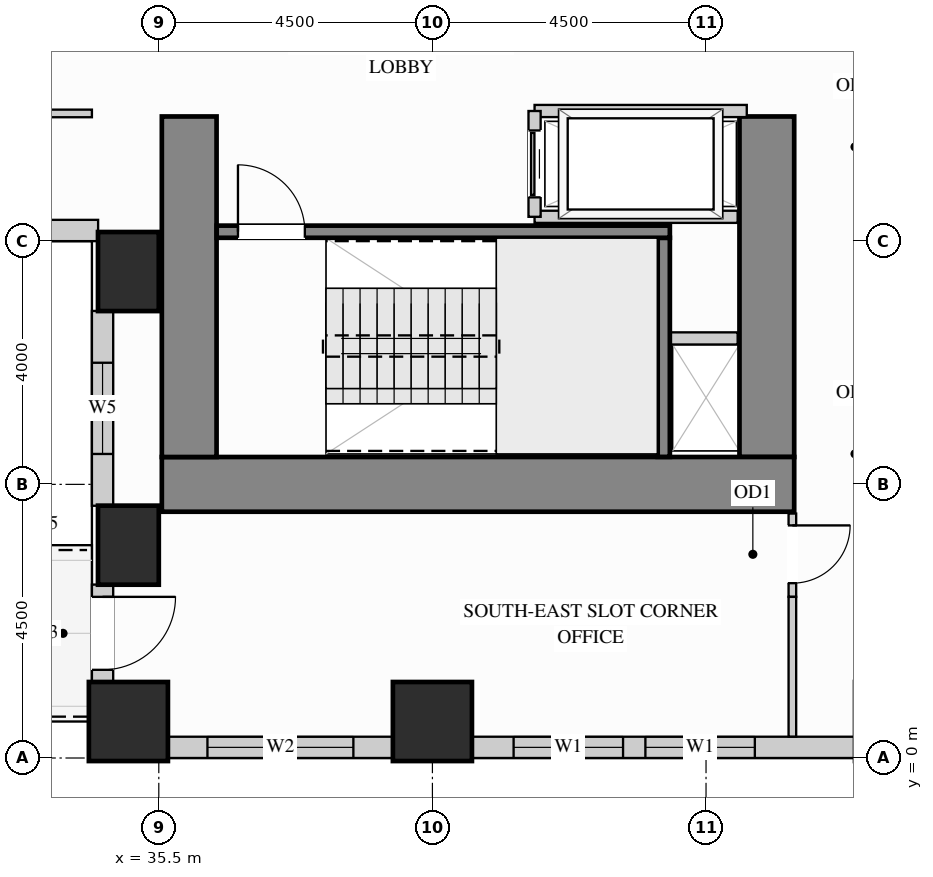
"""IFC4 building model, lengths in metres.
Left out: names, types, materials, properties, quantities, classifications, styles, units other than length and angle.
Written with IfcOpenShell. Run it as: python <this file> out.ifc"""

import sys

from ifc_helpers import new_model, si_unit, direction, frame, frame_2d, origin, origin_2d, place, context, subcontext, project, spatial, rectangle, extrude, source, transform, mapped, element, fill, save


model = new_model("IFC4")
c1 = context("Model", 3, precision=1e-05, world=origin(), true_north=direction((0.0, 1.0)))
c2 = subcontext(c1, "Body", "Model", "MODEL_VIEW")
j1 = project(units=[si_unit("LENGTHUNIT", "METRE"), si_unit("PLANEANGLEUNIT", "RADIAN")], contexts=[c1])
p1 = place(None, origin())
s1 = spatial("IfcSite", under=j1, at=p1, CompositionType="ELEMENT")
p2 = place(p1, origin())
s2 = spatial("IfcBuilding", under=s1, at=p2, CompositionType="ELEMENT")
p3 = place(p2, frame((0.0, 0.0, 33.3)))
s3 = spatial("IfcBuildingStorey", under=s2, at=p3, CompositionType="ELEMENT", Elevation=33.3)
m1 = source(origin(), c2, "Body", "SweptSolid", [
    extrude(rectangle(XDim=1.0, YDim=1.3, at=origin_2d()), origin(), (0.0, 0.0, 1.0), 3.38),
])
for number, where, z_axis, x_axis in (
    (1, (35.0, 3.5, 0.0), (0.0, 0.0, 1.0), (1.0, 0.0, 0.0)),
    (2, (35.0, 8.0, 0.0), (0.0, 0.0, 1.0), (1.0, 0.0, 0.0)),
):
    element("IfcColumn", number, at=place(p3, frame(where, z_axis=z_axis, x_axis=x_axis)), inside=s3, PredefinedType="COLUMN", context=c2, shape_type="MappedRepresentation", body=[
        mapped(m1, transform((0.0, 0.0, 0.0), x_axis=(1.0, 0.0, 0.0), y_axis=(0.0, 1.0, 0.0), z_axis=(0.0, 0.0, 1.0))),
    ])
m2 = source(origin(), c2, "Body", "SweptSolid", [
    extrude(rectangle(XDim=1.3, YDim=1.3, at=origin_2d()), origin(), (0.0, 0.0, 1.0), 3.38),
])
for number, where, z_axis, x_axis in (
    (3, (35.0, 0.6, 0.0), (0.0, 0.0, 1.0), (1.0, 0.0, 0.0)),
    (4, (40.0, 0.6, 0.0), (0.0, 0.0, 1.0), (1.0, 0.0, 0.0)),
):
    element("IfcColumn", number, at=place(p3, frame(where, z_axis=z_axis, x_axis=x_axis)), inside=s3, PredefinedType="COLUMN", context=c2, shape_type="MappedRepresentation", body=[
        mapped(m2, transform((0.0, 0.0, 0.0), x_axis=(1.0, 0.0, 0.0), y_axis=(0.0, 1.0, 0.0), z_axis=(0.0, 0.0, 1.0))),
    ])
m3 = source(origin(), c2, "Body", "SweptSolid", [
    extrude(rectangle(XDim=5.6, YDim=0.9, at=frame_2d((2.8, 0.0))), origin(), (0.0, 0.0, 1.0), 3.38),
])
p4 = place(p3, frame((45.5, 4.95, 0.0), z_axis=(0.0, 0.0, 1.0), x_axis=(0.0, 1.0, 0.0)))
e5 = element("IfcWall", 5, at=p4, inside=s3, PredefinedType="SHEAR", context=c2, shape_type="MappedRepresentation", body=[
    mapped(m3, transform((0.0, 0.0, 0.0), x_axis=(1.0, 0.0, 0.0), y_axis=(0.0, 1.0, 0.0), z_axis=(0.0, 0.0, 1.0))),
])
m4 = source(origin(), c2, "Body", "SweptSolid", [
    extrude(rectangle(XDim=10.4, YDim=0.9, at=frame_2d((5.2, 0.0))), origin(), (0.0, 0.0, 1.0), 3.38),
])
p5 = place(p3, frame((35.55, 4.5, 0.0), z_axis=(0.0, 0.0, 1.0), x_axis=(1.0, 0.0, 0.0)))
e6 = element("IfcWall", 6, at=p5, inside=s3, PredefinedType="SHEAR", context=c2, shape_type="MappedRepresentation", body=[
    mapped(m4, transform((0.0, 0.0, 0.0), x_axis=(1.0, 0.0, 0.0), y_axis=(0.0, 1.0, 0.0), z_axis=(0.0, 0.0, 1.0))),
])
p6 = place(p3, frame((36.0, 4.95, 0.0), z_axis=(0.0, 0.0, 1.0), x_axis=(0.0, 1.0, 0.0)))
e7 = element("IfcWall", 7, at=p6, inside=s3, PredefinedType="SHEAR", context=c2, shape_type="MappedRepresentation", body=[
    mapped(m3, transform((0.0, 0.0, 0.0), x_axis=(1.0, 0.0, 0.0), y_axis=(0.0, 1.0, 0.0), z_axis=(0.0, 0.0, 1.0))),
])
p7 = place(p3, frame((30.998, 8.675, 0.0), z_axis=(0.0, 0.0, 1.0), x_axis=(1.0, 0.0, 0.0)))
e8 = element("IfcWall", 8, at=p7, inside=s3, PredefinedType="SOLIDWALL", context=c2, shape_type="SweptSolid", body=[
    extrude(rectangle(XDim=3.504, YDim=0.35, at=frame_2d((1.752, 0.0))), origin(), (0.0, 0.0, 1.0), 3.365),
])
p8 = place(p7, frame((1.002, 0.0, 0.78)))
e9 = element("IfcOpeningElement", 9, at=p8, cuts=e8, PredefinedType="OPENING", context=c2, shape_type="SweptSolid", body=[
    extrude(rectangle(XDim=1.5, YDim=2.0, at=frame_2d((0.75, 1.0))), frame((0.0, 0.185, 0.0), z_axis=(0.0, -1.0, 0.0), x_axis=(1.0, 0.0, 0.0)), (0.0, 0.0, 1.0), 0.37),
])
p9 = place(p3, frame((34.575, 7.352, 0.0), z_axis=(0.0, 0.0, 1.0), x_axis=(0.0, -1.0, 0.0)))
e10 = element("IfcWall", 10, at=p9, inside=s3, PredefinedType="SOLIDWALL", context=c2, shape_type="SweptSolid", body=[
    extrude(rectangle(XDim=3.204, YDim=0.35, at=frame_2d((1.602, 0.0))), origin(), (0.0, 0.0, 1.0), 2.51),
])
p10 = place(p9, frame((0.852, 0.0, 0.78)))
e11 = element("IfcOpeningElement", 11, at=p10, cuts=e10, PredefinedType="OPENING", context=c2, shape_type="SweptSolid", body=[
    extrude(rectangle(XDim=1.5, YDim=1.55, at=frame_2d((0.75, 0.775))), frame((0.0, 0.185, 0.0), z_axis=(0.0, -1.0, 0.0), x_axis=(1.0, 0.0, 0.0)), (0.0, 0.0, 1.0), 0.37),
])
p11 = place(p3, frame((34.575, 2.852, 0.0), z_axis=(0.0, 0.0, 1.0), x_axis=(0.0, -1.0, 0.0)))
e12 = element("IfcWall", 12, at=p11, inside=s3, PredefinedType="SOLIDWALL", context=c2, shape_type="SweptSolid", body=[
    extrude(rectangle(XDim=1.604, YDim=0.35, at=frame_2d((0.802, 0.0))), origin(), (0.0, 0.0, 1.0), 2.51),
])
p12 = place(p11, frame((0.202, 0.0, 0.0)))
e13 = element("IfcOpeningElement", 13, at=p12, cuts=e12, PredefinedType="OPENING", context=c2, shape_type="SweptSolid", body=[
    extrude(rectangle(XDim=1.2, YDim=2.15, at=frame_2d((0.6, 1.075))), frame((0.0, 0.185, 0.0), z_axis=(0.0, -1.0, 0.0), x_axis=(1.0, 0.0, 0.0)), (0.0, 0.0, 1.0), 0.37),
])
p13 = place(p3, frame((35.648, 0.175, 0.0), z_axis=(0.0, 0.0, 1.0), x_axis=(1.0, 0.0, 0.0)))
e14 = element("IfcWall", 14, at=p13, inside=s3, PredefinedType="SOLIDWALL", context=c2, shape_type="SweptSolid", body=[
    extrude(rectangle(XDim=3.704, YDim=0.35, at=frame_2d((1.852, 0.0))), origin(), (0.0, 0.0, 1.0), 2.51),
])
p14 = place(p13, frame((0.652, 0.0, 0.78)))
e15 = element("IfcOpeningElement", 15, at=p14, cuts=e14, PredefinedType="OPENING", context=c2, shape_type="SweptSolid", body=[
    extrude(rectangle(XDim=2.4, YDim=1.55, at=frame_2d((1.2, 0.775))), frame((0.0, 0.185, 0.0), z_axis=(0.0, -1.0, 0.0), x_axis=(1.0, 0.0, 0.0)), (0.0, 0.0, 1.0), 0.37),
])
p15 = place(p3, frame((40.648, 0.175, 0.0), z_axis=(0.0, 0.0, 1.0), x_axis=(1.0, 0.0, 0.0)))
e16 = element("IfcWall", 16, at=p15, inside=s3, PredefinedType="SOLIDWALL", context=c2, shape_type="SweptSolid", body=[
    extrude(rectangle(XDim=6.304, YDim=0.35, at=frame_2d((3.152, 0.0))), origin(), (0.0, 0.0, 1.0), 2.51),
])
p16 = place(p15, frame((0.687, 0.0, 0.78)))
e17 = element("IfcOpeningElement", 17, at=p16, cuts=e16, PredefinedType="OPENING", context=c2, shape_type="SweptSolid", body=[
    extrude(rectangle(XDim=1.8, YDim=1.55, at=frame_2d((0.9, 0.775))), frame((0.0, 0.185, 0.0), z_axis=(0.0, -1.0, 0.0), x_axis=(1.0, 0.0, 0.0)), (0.0, 0.0, 1.0), 0.37),
])
p17 = place(p15, frame((2.855, 0.0, 0.78)))
e18 = element("IfcOpeningElement", 18, at=p17, cuts=e16, PredefinedType="OPENING", context=c2, shape_type="SweptSolid", body=[
    extrude(rectangle(XDim=1.8, YDim=1.55, at=frame_2d((0.9, 0.775))), frame((0.0, 0.185, 0.0), z_axis=(0.0, -1.0, 0.0), x_axis=(1.0, 0.0, 0.0)), (0.0, 0.0, 1.0), 0.37),
])
p18 = place(p3, frame((45.92, 2.65, 0.0), z_axis=(0.0, 0.0, 1.0), x_axis=(0.0, 1.0, 0.0)))
e19 = element("IfcWall", 19, at=p18, inside=s3, PredefinedType="PARTITIONING", context=c2, shape_type="SweptSolid", body=[
    extrude(rectangle(XDim=1.37, YDim=0.125, at=frame_2d((0.685, 0.0))), origin(), (0.0, 0.0, 1.0), 3.365),
])
p19 = place(p18, frame((0.225, 0.0, 0.0)))
e20 = element("IfcOpeningElement", 20, at=p19, cuts=e19, PredefinedType="OPENING", context=c2, shape_type="SweptSolid", body=[
    extrude(rectangle(XDim=0.95, YDim=2.15, at=frame_2d((0.475, 1.075))), frame((0.0, 0.073, 0.0), z_axis=(0.0, -1.0, 0.0), x_axis=(1.0, 0.0, 0.0)), (0.0, 0.0, 1.0), 0.145),
])
m5 = source(origin(), c2, "Body", "SweptSolid", [
    extrude(rectangle(XDim=2.298, YDim=0.125, at=frame_2d((1.149, 0.0))), origin(), (0.0, 0.0, 1.0), 3.365),
])
p20 = place(p3, frame((45.92, 0.352, 0.0), z_axis=(0.0, 0.0, 1.0), x_axis=(0.0, 1.0, 0.0)))
e21 = element("IfcWall", 21, at=p20, inside=s3, PredefinedType="PARTITIONING", context=c2, shape_type="MappedRepresentation", body=[
    mapped(m5, transform((0.0, 0.0, 0.0), x_axis=(1.0, 0.0, 0.0), y_axis=(0.0, 1.0, 0.0), z_axis=(0.0, 0.0, 1.0))),
])
p21 = place(p3, frame((19.5, 10.6, 0.0), z_axis=(0.0, 0.0, 1.0), x_axis=(1.0, 0.0, 0.0)))
e22 = element("IfcWall", 22, at=p21, inside=s3, PredefinedType="PARTITIONING", context=c2, shape_type="SweptSolid", body=[
    extrude(rectangle(XDim=14.9, YDim=0.125, at=frame_2d((7.45, 0.0))), origin(), (0.0, 0.0, 1.0), 3.365),
])
p22 = place(p21, frame((6.975, 0.0, 0.0)))
e23 = element("IfcOpeningElement", 23, at=p22, cuts=e22, PredefinedType="OPENING", context=c2, shape_type="SweptSolid", body=[
    extrude(rectangle(XDim=0.95, YDim=2.15, at=frame_2d((0.475, 1.075))), frame((0.0, 0.073, 0.0), z_axis=(0.0, -1.0, 0.0), x_axis=(1.0, 0.0, 0.0)), (0.0, 0.0, 1.0), 0.145),
])
m6 = source(origin(), c2, "Body", "SweptSolid", [
    extrude(rectangle(XDim=1.17, YDim=0.2, at=frame_2d((0.585, 0.0))), origin(), (0.0, 0.0, 1.0), 3.365),
])
p23 = place(p3, frame((43.85, 6.9, 0.0), z_axis=(0.0, 0.0, 1.0), x_axis=(1.0, 0.0, 0.0)))
e24 = element("IfcWall", 24, at=p23, inside=s3, PredefinedType="PARTITIONING", context=c2, shape_type="MappedRepresentation", body=[
    mapped(m6, transform((0.0, 0.0, 0.0), x_axis=(1.0, 0.0, 0.0), y_axis=(0.0, 1.0, 0.0), z_axis=(0.0, 0.0, 1.0))),
])
m7 = source(origin(), c2, "Body", "SweptSolid", [
    extrude(rectangle(XDim=3.49, YDim=0.2, at=frame_2d((1.745, 0.0))), origin(), (0.0, 0.0, 1.0), 3.365),
])
p24 = place(p3, frame((41.68, 10.64, 0.0), z_axis=(0.0, 0.0, 1.0), x_axis=(1.0, 0.0, 0.0)))
e25 = element("IfcWall", 25, at=p24, inside=s3, PredefinedType="PARTITIONING", context=c2, shape_type="MappedRepresentation", body=[
    mapped(m7, transform((0.0, 0.0, 0.0), x_axis=(1.0, 0.0, 0.0), y_axis=(0.0, 1.0, 0.0), z_axis=(0.0, 0.0, 1.0))),
])
m8 = source(origin(), c2, "Body", "SweptSolid", [
    extrude(rectangle(XDim=3.34, YDim=0.2, at=frame_2d((1.67, 0.0))), origin(), (0.0, 0.0, 1.0), 3.365),
])
p25 = place(p3, frame((41.68, 8.9, 0.0), z_axis=(0.0, 0.0, 1.0), x_axis=(1.0, 0.0, 0.0)))
e26 = element("IfcWall", 26, at=p25, inside=s3, PredefinedType="PARTITIONING", context=c2, shape_type="MappedRepresentation", body=[
    mapped(m8, transform((0.0, 0.0, 0.0), x_axis=(1.0, 0.0, 0.0), y_axis=(0.0, 1.0, 0.0), z_axis=(0.0, 0.0, 1.0))),
])
p26 = place(p3, frame((41.68, 8.9, 0.0), z_axis=(0.0, 0.0, 1.0), x_axis=(0.0, 1.0, 0.0)))
e27 = element("IfcWall", 27, at=p26, inside=s3, PredefinedType="PARTITIONING", context=c2, shape_type="SweptSolid", body=[
    extrude(rectangle(XDim=1.74, YDim=0.2, at=frame_2d((0.87, 0.0))), origin(), (0.0, 0.0, 1.0), 3.365),
])
p27 = place(p26, frame((0.32, 0.0, 0.0)))
e28 = element("IfcOpeningElement", 28, at=p27, cuts=e27, PredefinedType="OPENING", context=c2, shape_type="SweptSolid", body=[
    extrude(rectangle(XDim=1.1, YDim=2.2, at=frame_2d((0.55, 1.1))), frame((0.0, 0.11, 0.0), z_axis=(0.0, -1.0, 0.0), x_axis=(1.0, 0.0, 0.0)), (0.0, 0.0, 1.0), 0.22),
])
m9 = source(origin(), c2, "Body", "SweptSolid", [
    extrude(rectangle(XDim=3.603, YDim=0.2, at=frame_2d((1.802, 0.0))), origin(), (0.0, 0.0, 1.0), 3.38),
])
p28 = place(p3, frame((43.805, 4.952, 0.0), z_axis=(0.0, 0.0, 1.0), x_axis=(0.0, 1.0, 0.0)))
e29 = element("IfcWall", 29, at=p28, inside=s3, PredefinedType="SHEAR", context=c2, shape_type="MappedRepresentation", body=[
    mapped(m9, transform((0.0, 0.0, 0.0), x_axis=(1.0, 0.0, 0.0), y_axis=(0.0, 1.0, 0.0), z_axis=(0.0, 0.0, 1.0))),
])
p29 = place(p3, frame((36.452, 8.655, 0.0), z_axis=(0.0, 0.0, 1.0), x_axis=(1.0, 0.0, 0.0)))
e30 = element("IfcWall", 30, at=p29, inside=s3, PredefinedType="SHEAR", context=c2, shape_type="SweptSolid", body=[
    extrude(rectangle(XDim=7.453, YDim=0.2, at=frame_2d((3.727, 0.0))), origin(), (0.0, 0.0, 1.0), 3.38),
])
p30 = place(p29, frame((0.35, 0.0, 0.0)))
e31 = element("IfcOpeningElement", 31, at=p30, cuts=e30, PredefinedType="OPENING", context=c2, shape_type="SweptSolid", body=[
    extrude(rectangle(XDim=1.1, YDim=2.15, at=frame_2d((0.55, 1.075))), frame((0.0, 0.11, 0.0), z_axis=(0.0, -1.0, 0.0), x_axis=(1.0, 0.0, 0.0)), (0.0, 0.0, 1.0), 0.22),
])
m10 = source(origin(), c2, "Body", "SweptSolid", [
    extrude(rectangle(XDim=1.2, YDim=2.15, at=frame_2d((0.6, 1.075))), frame((0.0, 0.025, 0.0), z_axis=(0.0, -1.0, 0.0), x_axis=(1.0, 0.0, 0.0)), (0.0, 0.0, 1.0), 0.05),
])
p31 = place(p12, frame((1.2, 0.0, 0.0), z_axis=(0.0, 0.0, 1.0), x_axis=(-1.0, 0.0, 0.0)))
e32 = element("IfcDoor", 32, at=p31, inside=s3, OperationType="SINGLE_SWING_LEFT", PredefinedType="DOOR", context=c2, shape_type="MappedRepresentation", body=[
    mapped(m10, transform((0.0, 0.0, 0.0), x_axis=(1.0, 0.0, 0.0), y_axis=(0.0, 1.0, 0.0), z_axis=(0.0, 0.0, 1.0))),
])
fill(e13, e32)
m11 = source(origin(), c2, "Body", "SweptSolid", [
    extrude(rectangle(XDim=1.1, YDim=2.2, at=frame_2d((0.55, 1.1))), frame((0.0, 0.025, 0.0), z_axis=(0.0, -1.0, 0.0), x_axis=(1.0, 0.0, 0.0)), (0.0, 0.0, 1.0), 0.05),
])
p32 = place(p27, origin())
e33 = element("IfcDoor", 33, at=p32, inside=s3, OperationType="SLIDING_TO_LEFT", PredefinedType="DOOR", context=c2, shape_type="MappedRepresentation", body=[
    mapped(m11, transform((0.0, 0.0, 0.0), x_axis=(1.0, 0.0, 0.0), y_axis=(0.0, 1.0, 0.0), z_axis=(0.0, 0.0, 1.0))),
])
fill(e28, e33)
m12 = source(origin(), c2, "Body", "SweptSolid", [
    extrude(rectangle(XDim=0.95, YDim=2.15, at=frame_2d((0.475, 1.075))), frame((0.0, 0.025, 0.0), z_axis=(0.0, -1.0, 0.0), x_axis=(1.0, 0.0, 0.0)), (0.0, 0.0, 1.0), 0.05),
])
p33 = place(p19, origin())
e34 = element("IfcDoor", 34, at=p33, inside=s3, OperationType="SINGLE_SWING_RIGHT", PredefinedType="DOOR", context=c2, shape_type="MappedRepresentation", body=[
    mapped(m12, transform((0.0, 0.0, 0.0), x_axis=(1.0, 0.0, 0.0), y_axis=(0.0, 1.0, 0.0), z_axis=(0.0, 0.0, 1.0))),
])
fill(e20, e34)
m13 = source(origin(), c2, "Body", "SweptSolid", [
    extrude(rectangle(XDim=1.1, YDim=2.15, at=frame_2d((0.55, 1.075))), frame((0.0, 0.025, 0.0), z_axis=(0.0, -1.0, 0.0), x_axis=(1.0, 0.0, 0.0)), (0.0, 0.0, 1.0), 0.05),
])
p34 = place(p30, origin())
e35 = element("IfcDoor", 35, at=p34, inside=s3, OperationType="SINGLE_SWING_LEFT", PredefinedType="DOOR", context=c2, shape_type="MappedRepresentation", body=[
    mapped(m13, transform((0.0, 0.0, 0.0), x_axis=(1.0, 0.0, 0.0), y_axis=(0.0, 1.0, 0.0), z_axis=(0.0, 0.0, 1.0))),
])
fill(e31, e35)
m14 = source(origin(), c2, "Body", "SweptSolid", [
    extrude(rectangle(XDim=1.8, YDim=1.55, at=frame_2d((0.9, 0.775))), frame((0.0, 0.03, 0.0), z_axis=(0.0, -1.0, 0.0), x_axis=(1.0, 0.0, 0.0)), (0.0, 0.0, 1.0), 0.06),
])
p35 = place(p16, origin())
e36 = element("IfcWindow", 36, at=p35, inside=s3, PartitioningType="SINGLE_PANEL", PredefinedType="WINDOW", context=c2, shape_type="MappedRepresentation", body=[
    mapped(m14, transform((0.0, 0.0, 0.0), x_axis=(1.0, 0.0, 0.0), y_axis=(0.0, 1.0, 0.0), z_axis=(0.0, 0.0, 1.0))),
])
fill(e17, e36)
p36 = place(p17, origin())
e37 = element("IfcWindow", 37, at=p36, inside=s3, PartitioningType="SINGLE_PANEL", PredefinedType="WINDOW", context=c2, shape_type="MappedRepresentation", body=[
    mapped(m14, transform((0.0, 0.0, 0.0), x_axis=(1.0, 0.0, 0.0), y_axis=(0.0, 1.0, 0.0), z_axis=(0.0, 0.0, 1.0))),
])
fill(e18, e37)
m15 = source(origin(), c2, "Body", "SweptSolid", [
    extrude(rectangle(XDim=2.4, YDim=1.55, at=frame_2d((1.2, 0.775))), frame((0.0, 0.03, 0.0), z_axis=(0.0, -1.0, 0.0), x_axis=(1.0, 0.0, 0.0)), (0.0, 0.0, 1.0), 0.06),
])
p37 = place(p14, origin())
e38 = element("IfcWindow", 38, at=p37, inside=s3, PartitioningType="SINGLE_PANEL", PredefinedType="WINDOW", context=c2, shape_type="MappedRepresentation", body=[
    mapped(m15, transform((0.0, 0.0, 0.0), x_axis=(1.0, 0.0, 0.0), y_axis=(0.0, 1.0, 0.0), z_axis=(0.0, 0.0, 1.0))),
])
fill(e15, e38)
m16 = source(origin(), c2, "Body", "SweptSolid", [
    extrude(rectangle(XDim=1.5, YDim=1.55, at=frame_2d((0.75, 0.775))), frame((0.0, 0.03, 0.0), z_axis=(0.0, -1.0, 0.0), x_axis=(1.0, 0.0, 0.0)), (0.0, 0.0, 1.0), 0.06),
])
p38 = place(p10, origin())
e39 = element("IfcWindow", 39, at=p38, inside=s3, PartitioningType="SINGLE_PANEL", PredefinedType="WINDOW", context=c2, shape_type="MappedRepresentation", body=[
    mapped(m16, transform((0.0, 0.0, 0.0), x_axis=(1.0, 0.0, 0.0), y_axis=(0.0, 1.0, 0.0), z_axis=(0.0, 0.0, 1.0))),
])
fill(e11, e39)
save(model, sys.argv[1])
